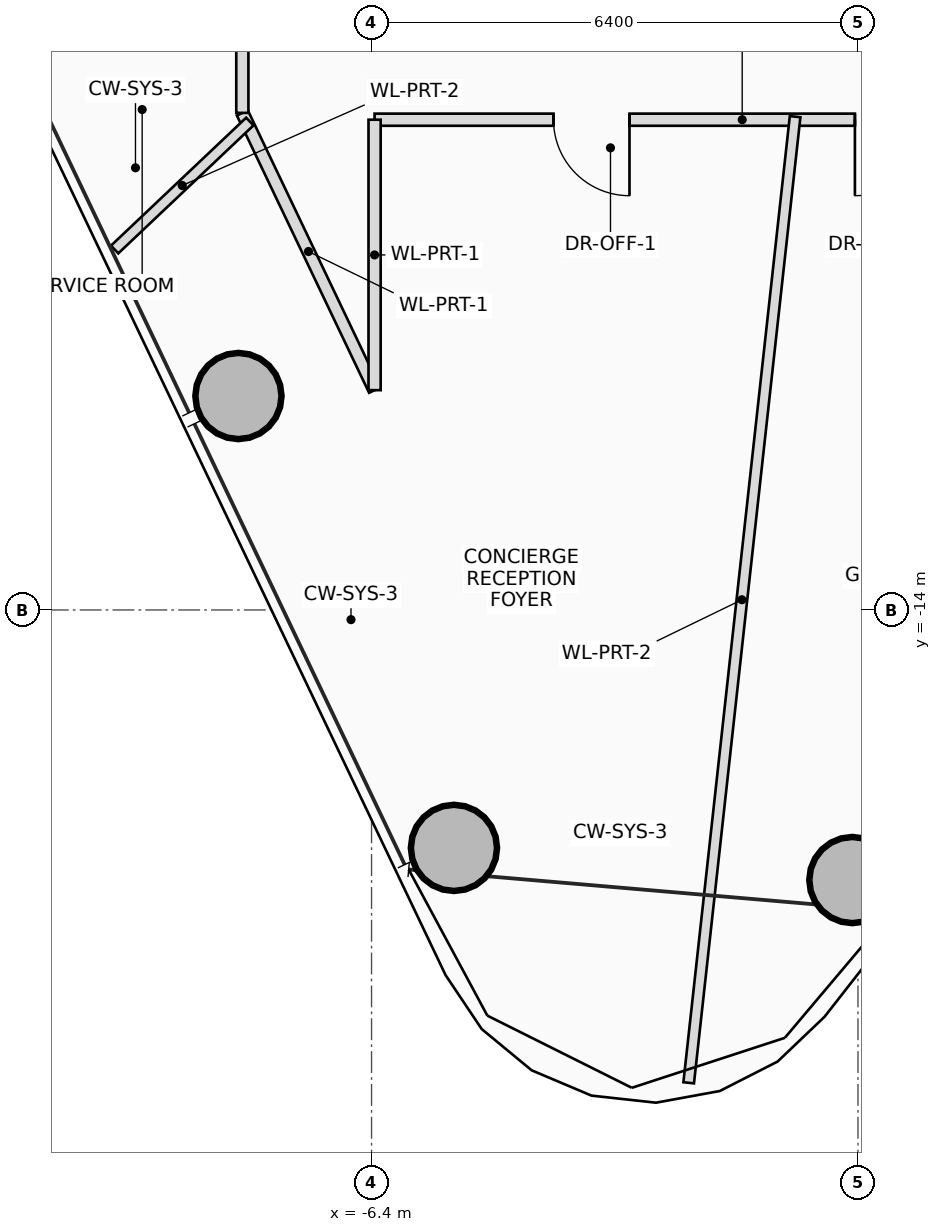
"""IFC4 building model, lengths in metres.
Left out: names, types, materials, properties, quantities, classifications, styles, units other than length and angle.
Written with IfcOpenShell. Run it as: python <this file> out.ifc"""

import sys

from ifc_helpers import new_model, si_unit, direction, frame, frame_2d, origin, origin_2d, place, context, subcontext, project, spatial, rectangle, hollow_circle, extrude, source, transform, mapped, element, fill, save


model = new_model("IFC4")
c1 = context("Model", 3, precision=1e-05, world=origin(), true_north=direction((0.0, 1.0)))
c2 = subcontext(c1, "Body", "Model", "MODEL_VIEW")
j1 = project(units=[si_unit("LENGTHUNIT", "METRE"), si_unit("PLANEANGLEUNIT", "RADIAN")], contexts=[c1])
p1 = place(None, origin())
s1 = spatial("IfcSite", under=j1, at=p1, CompositionType="ELEMENT")
p2 = place(p1, origin())
s2 = spatial("IfcBuilding", under=s1, at=p2, CompositionType="ELEMENT")
p3 = place(p2, frame((0.0, 0.0, 201.8)))
s3 = spatial("IfcBuildingStorey", under=s2, at=p3, CompositionType="ELEMENT", Elevation=201.8)
m1 = source(origin(), c2, "Body", "SweptSolid", [
    extrude(hollow_circle(Radius=0.575, WallThickness=0.042, at=origin_2d()), origin(), (0.0, 0.0, 1.0), 3.45),
])
for number, where, z_axis, x_axis in (
    (1, (-0.073, -17.553, 0.0), (0.0, 0.0, 1.0), (1.0, 0.0, 0.0)),
    (2, (-8.151, -11.185, 0.0), (0.0, 0.0, 1.0), (1.0, 0.0, 0.0)),
    (3, (-5.316, -17.13, 0.0), (0.0, 0.0, 1.0), (1.0, 0.0, 0.0)),
):
    element("IfcColumn", number, at=place(p3, frame(where, z_axis=z_axis, x_axis=x_axis)), inside=s3, PredefinedType="COLUMN", context=c2, shape_type="MappedRepresentation", body=[
        mapped(m1, transform((0.0, 0.0, 0.0), scale=1.0)),
    ])
p4 = place(p3, frame((-6.36, -11.108, 0.0), z_axis=(0.0, 0.0, 1.0), x_axis=(-0.430489180359, 0.902595737633, 0.0)))
e4 = element("IfcWall", 4, at=p4, inside=s3, PredefinedType="PARTITIONING", context=c2, shape_type="SweptSolid", body=[
    extrude(rectangle(XDim=4.042, YDim=0.16, at=frame_2d((2.021, 0.0))), origin(), (0.0, 0.0, 1.0), 2.605),
])
p5 = place(p3, frame((-8.1, -7.46, 0.0), z_axis=(0.0, 0.0, 1.0), x_axis=(0.0, 1.0, 0.0)))
e5 = element("IfcWall", 5, at=p5, inside=s3, PredefinedType="PARTITIONING", context=c2, shape_type="SweptSolid", body=[
    extrude(rectangle(XDim=15.01, YDim=0.16, at=frame_2d((7.505, 0.0))), origin(), (0.0, 0.0, 1.0), 2.605),
])
p6 = place(p5, frame((1.537, 0.0, 0.0)))
e6 = element("IfcOpeningElement", 6, at=p6, cuts=e5, PredefinedType="OPENING", context=c2, shape_type="SweptSolid", body=[
    extrude(rectangle(XDim=0.9, YDim=2.05, at=frame_2d((0.45, 1.025))), frame((0.0, 0.09, 0.0), z_axis=(0.0, -1.0, 0.0), x_axis=(1.0, 0.0, 0.0)), (0.0, 0.0, 1.0), 0.18),
])
p7 = place(p5, frame((6.522, 0.0, 0.0)))
e7 = element("IfcOpeningElement", 7, at=p7, cuts=e5, PredefinedType="OPENING", context=c2, shape_type="SweptSolid", body=[
    extrude(rectangle(XDim=1.05, YDim=2.2, at=frame_2d((0.525, 1.1))), frame((0.0, 0.09, 0.0), z_axis=(0.0, -1.0, 0.0), x_axis=(1.0, 0.0, 0.0)), (0.0, 0.0, 1.0), 0.18),
])
p8 = place(p5, frame((11.604, 0.0, 0.0)))
e8 = element("IfcOpeningElement", 8, at=p8, cuts=e5, PredefinedType="OPENING", context=c2, shape_type="SweptSolid", body=[
    extrude(rectangle(XDim=1.05, YDim=2.2, at=frame_2d((0.525, 1.1))), frame((0.0, 0.09, 0.0), z_axis=(0.0, -1.0, 0.0), x_axis=(1.0, 0.0, 0.0)), (0.0, 0.0, 1.0), 0.18),
])
p9 = place(p3, frame((5.25, -7.55, 0.0), z_axis=(0.0, 0.0, 1.0), x_axis=(-1.0, 0.0, 0.0)))
e9 = element("IfcWall", 9, at=p9, inside=s3, PredefinedType="PARTITIONING", context=c2, shape_type="SweptSolid", body=[
    extrude(rectangle(XDim=11.61, YDim=0.16, at=frame_2d((5.805, 0.0))), origin(), (0.0, 0.0, 1.0), 2.605),
])
p10 = place(p9, frame((1.337, 0.0, 0.0)))
e10 = element("IfcOpeningElement", 10, at=p10, cuts=e9, PredefinedType="OPENING", context=c2, shape_type="SweptSolid", body=[
    extrude(rectangle(XDim=1.0, YDim=2.25, at=frame_2d((0.5, 1.125))), frame((0.0, 0.09, 0.0), z_axis=(0.0, -1.0, 0.0), x_axis=(1.0, 0.0, 0.0)), (0.0, 0.0, 1.0), 0.18),
])
p11 = place(p9, frame((4.29, 0.0, 0.0)))
e11 = element("IfcOpeningElement", 11, at=p11, cuts=e9, PredefinedType="OPENING", context=c2, shape_type="SweptSolid", body=[
    extrude(rectangle(XDim=1.0, YDim=2.25, at=frame_2d((0.5, 1.125))), frame((0.0, 0.09, 0.0), z_axis=(0.0, -1.0, 0.0), x_axis=(1.0, 0.0, 0.0)), (0.0, 0.0, 1.0), 0.18),
])
p12 = place(p9, frame((8.256, 0.0, 0.0)))
e12 = element("IfcOpeningElement", 12, at=p12, cuts=e9, PredefinedType="OPENING", context=c2, shape_type="SweptSolid", body=[
    extrude(rectangle(XDim=1.0, YDim=2.25, at=frame_2d((0.5, 1.125))), frame((0.0, 0.09, 0.0), z_axis=(0.0, -1.0, 0.0), x_axis=(1.0, 0.0, 0.0)), (0.0, 0.0, 1.0), 0.18),
])
p13 = place(p3, frame((-6.36, -7.55, 0.0), z_axis=(0.0, 0.0, 1.0), x_axis=(0.0, -1.0, 0.0)))
e13 = element("IfcWall", 13, at=p13, inside=s3, PredefinedType="PARTITIONING", context=c2, shape_type="SweptSolid", body=[
    extrude(rectangle(XDim=3.558, YDim=0.16, at=frame_2d((1.779, 0.0))), origin(), (0.0, 0.0, 1.0), 3.25),
])
p14 = place(p3, frame((-8.001, -7.574, 0.0), z_axis=(0.0, 0.0, 1.0), x_axis=(-0.726232954986, -0.687448685424, 0.0)))
e14 = element("IfcWall", 14, at=p14, inside=s3, PredefinedType="PARTITIONING", context=c2, shape_type="SweptSolid", body=[
    extrude(rectangle(XDim=2.449, YDim=0.14, at=frame_2d((1.224, 0.0))), origin(), (0.0, 0.0, 1.0), 2.765),
])
p15 = place(p3, frame((-0.827, -7.51, 0.0), z_axis=(0.0, 0.0, 1.0), x_axis=(-0.109492708445, -0.993987598915, 0.0)))
e15 = element("IfcWall", 15, at=p15, inside=s3, PredefinedType="PARTITIONING", context=c2, shape_type="SweptSolid", body=[
    extrude(rectangle(XDim=12.788, YDim=0.14, at=frame_2d((6.394, 0.0))), origin(), (0.0, 0.0, 1.0), 2.605),
])
p16 = place(p11, origin())
e16 = element("IfcDoor", 16, at=p16, inside=s3, OperationType="SINGLE_SWING_RIGHT", PredefinedType="DOOR", context=c2, shape_type="SweptSolid", body=[
    extrude(rectangle(XDim=1.0, YDim=2.25, at=frame_2d((0.5, 1.125))), frame((0.0, 0.025, 0.0), z_axis=(0.0, -1.0, 0.0), x_axis=(1.0, 0.0, 0.0)), (0.0, 0.0, 1.0), 0.05),
])
fill(e11, e16)
p17 = place(p12, origin())
e17 = element("IfcDoor", 17, at=p17, inside=s3, OperationType="SINGLE_SWING_LEFT", PredefinedType="DOOR", context=c2, shape_type="SweptSolid", body=[
    extrude(rectangle(XDim=1.0, YDim=2.25, at=frame_2d((0.5, 1.125))), frame((0.0, 0.025, 0.0), z_axis=(0.0, -1.0, 0.0), x_axis=(1.0, 0.0, 0.0)), (0.0, 0.0, 1.0), 0.05),
])
fill(e12, e17)
save(model, sys.argv[1])
